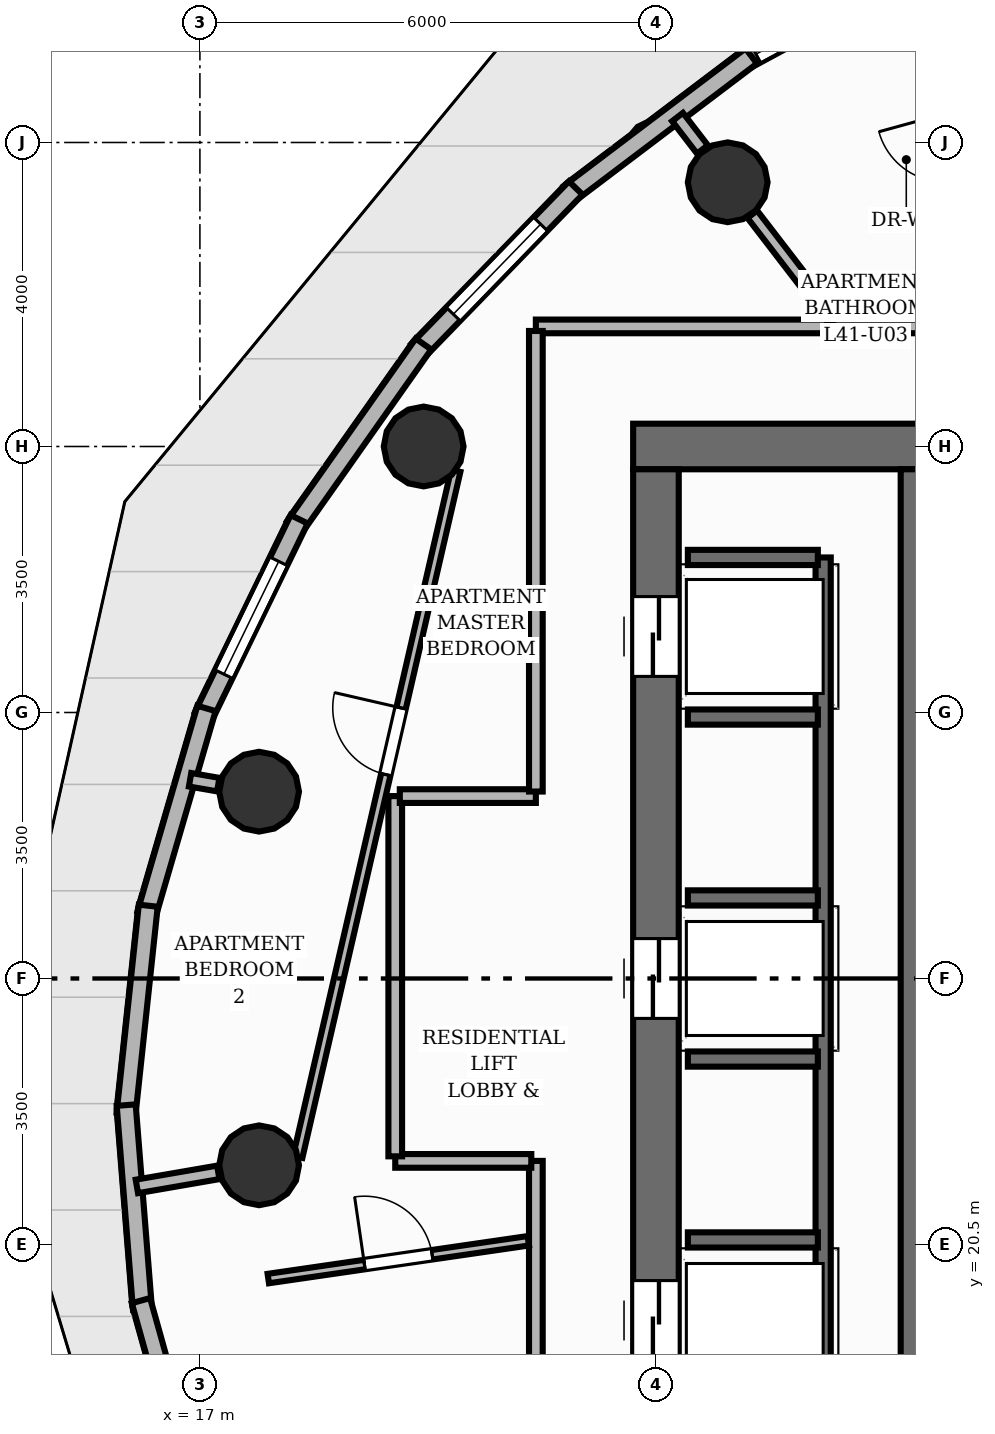
"""IFC4 building model, lengths in metres.
Left out: names, types, materials, properties, quantities, classifications, styles, units other than length and angle.
Written with IfcOpenShell. Run it as: python <this file> out.ifc"""

import sys

from ifc_helpers import new_model, si_unit, direction, frame, frame_2d, origin, origin_2d, place, context, subcontext, project, spatial, rectangle, circle, extrude, element, fill, save


model = new_model("IFC4")
c1 = context("Model", 3, precision=1e-05, world=origin(), true_north=direction((0.0, 1.0)))
c2 = subcontext(c1, "Body", "Model", "MODEL_VIEW")
j1 = project(units=[si_unit("LENGTHUNIT", "METRE"), si_unit("PLANEANGLEUNIT", "RADIAN")], contexts=[c1])
p1 = place(None, origin())
s1 = spatial("IfcSite", under=j1, at=p1, CompositionType="ELEMENT")
p2 = place(p1, origin())
s2 = spatial("IfcBuilding", under=s1, at=p2, CompositionType="ELEMENT")
p3 = place(p2, frame((0.0, 0.0, 139.36)))
s3 = spatial("IfcBuildingStorey", under=s2, at=p3, CompositionType="ELEMENT", Elevation=139.36)
p4 = place(p3, frame((22.7, 31.0, 0.0), z_axis=(0.0, 0.0, 1.0), x_axis=(1.0, 0.0, 0.0)))
e1 = element("IfcWall", 1, at=p4, inside=s3, PredefinedType="SHEAR", context=c2, shape_type="SweptSolid", body=[
    extrude(rectangle(XDim=15.1, YDim=0.6, at=frame_2d((7.55, 0.0))), origin(), (0.0, 0.0, 1.0), 3.2),
])
p5 = place(p4, frame((11.7, 0.0, 0.0)))
e2 = element("IfcOpeningElement", 2, at=p5, cuts=e1, PredefinedType="OPENING", context=c2, shape_type="SweptSolid", body=[
    extrude(rectangle(XDim=1.1, YDim=2.15, at=frame_2d((0.55, 1.075))), frame((0.0, 0.31, 0.0), z_axis=(0.0, -1.0, 0.0), x_axis=(1.0, 0.0, 0.0)), (0.0, 0.0, 1.0), 0.62),
])
p6 = place(p3, frame((23.0, 17.3, 0.0), z_axis=(0.0, 0.0, 1.0), x_axis=(0.0, 1.0, 0.0)))
e3 = element("IfcWall", 3, at=p6, inside=s3, PredefinedType="SHEAR", context=c2, shape_type="SweptSolid", body=[
    extrude(rectangle(XDim=13.4, YDim=0.6, at=frame_2d((6.7, 0.0))), origin(), (0.0, 0.0, 1.0), 3.2),
])
p7 = place(p6, frame((1.675, 0.0, 0.0)))
e4 = element("IfcOpeningElement", 4, at=p7, cuts=e3, PredefinedType="OPENING", context=c2, shape_type="SweptSolid", body=[
    extrude(rectangle(XDim=1.05, YDim=2.15, at=frame_2d((0.525, 1.075))), frame((0.0, 0.31, 0.0), z_axis=(0.0, -1.0, 0.0), x_axis=(1.0, 0.0, 0.0)), (0.0, 0.0, 1.0), 0.62),
])
p8 = place(p6, frame((6.175, 0.0, 0.0)))
e5 = element("IfcOpeningElement", 5, at=p8, cuts=e3, PredefinedType="OPENING", context=c2, shape_type="SweptSolid", body=[
    extrude(rectangle(XDim=1.05, YDim=2.15, at=frame_2d((0.525, 1.075))), frame((0.0, 0.31, 0.0), z_axis=(0.0, -1.0, 0.0), x_axis=(1.0, 0.0, 0.0)), (0.0, 0.0, 1.0), 0.62),
])
p9 = place(p6, frame((10.675, 0.0, 0.0)))
e6 = element("IfcOpeningElement", 6, at=p9, cuts=e3, PredefinedType="OPENING", context=c2, shape_type="SweptSolid", body=[
    extrude(rectangle(XDim=1.05, YDim=2.15, at=frame_2d((0.525, 1.075))), frame((0.0, 0.31, 0.0), z_axis=(0.0, -1.0, 0.0), x_axis=(1.0, 0.0, 0.0)), (0.0, 0.0, 1.0), 0.62),
])
p10 = place(p3, frame((26.5, 17.3, 0.0), z_axis=(0.0, 0.0, 1.0), x_axis=(0.0, 1.0, 0.0)))
e7 = element("IfcWall", 7, at=p10, inside=s3, PredefinedType="SHEAR", context=c2, shape_type="SweptSolid", body=[
    extrude(rectangle(XDim=13.4, YDim=0.56, at=frame_2d((6.7, 0.0))), origin(), (0.0, 0.0, 1.0), 3.2),
])
for number, where, z_axis, x_axis in (
    (8, (23.944, 34.477, 0.0), (0.0, 0.0, 1.0), (1.0, 0.0, 0.0)),
    (9, (19.944, 31.0, 0.0), (0.0, 0.0, 1.0), (1.0, 0.0, 0.0)),
    (10, (17.779, 26.458, 0.0), (0.0, 0.0, 1.0), (1.0, 0.0, 0.0)),
    (11, (17.779, 21.542, 0.0), (0.0, 0.0, 1.0), (1.0, 0.0, 0.0)),
):
    element("IfcColumn", number, at=place(p3, frame(where, z_axis=z_axis, x_axis=x_axis)), inside=s3, PredefinedType="COLUMN", context=c2, shape_type="SweptSolid", body=[
        extrude(circle(Radius=0.525, at=origin_2d()), origin(), (0.0, 0.0, 1.0), 3.2),
    ])
p11 = place(p3, frame((24.163, 36.079, 0.0), z_axis=(0.0, 0.0, 1.0), x_axis=(0.879567466611, 0.475774181393, 0.0)))
e12 = element("IfcWall", 12, at=p11, inside=s3, PredefinedType="SOLIDWALL", context=c2, shape_type="SweptSolid", body=[
    extrude(rectangle(XDim=2.998, YDim=0.25, at=frame_2d((1.499, 0.0))), origin(), (0.0, 0.0, 1.0), 2.96),
])
p12 = place(p11, frame((0.175, 0.0, 0.85)))
e13 = element("IfcOpeningElement", 13, at=p12, cuts=e12, PredefinedType="OPENING", context=c2, shape_type="SweptSolid", body=[
    extrude(rectangle(XDim=1.65, YDim=1.55, at=frame_2d((0.825, 0.775))), frame((0.0, 0.135, 0.0), z_axis=(0.0, -1.0, 0.0), x_axis=(1.0, 0.0, 0.0)), (0.0, 0.0, 1.0), 0.27),
])
p13 = place(p3, frame((21.863, 34.329, 0.0), z_axis=(0.0, 0.0, 1.0), x_axis=(0.797511213298, 0.603304122863, 0.0)))
e14 = element("IfcWall", 14, at=p13, inside=s3, PredefinedType="SOLIDWALL", context=c2, shape_type="SweptSolid", body=[
    extrude(rectangle(XDim=2.998, YDim=0.25, at=frame_2d((1.499, 0.0))), origin(), (0.0, 0.0, 1.0), 2.96),
])
p14 = place(p3, frame((19.872, 32.264, 0.0), z_axis=(0.0, 0.0, 1.0), x_axis=(0.696240605886, 0.717808483312, 0.0)))
e15 = element("IfcWall", 15, at=p14, inside=s3, PredefinedType="SOLIDWALL", context=c2, shape_type="SweptSolid", body=[
    extrude(rectangle(XDim=2.977, YDim=0.25, at=frame_2d((1.489, 0.0))), origin(), (0.0, 0.0, 1.0), 2.96),
])
p15 = place(p14, frame((0.664, 0.0, 0.85)))
e16 = element("IfcOpeningElement", 16, at=p15, cuts=e15, PredefinedType="OPENING", context=c2, shape_type="SweptSolid", body=[
    extrude(rectangle(XDim=1.65, YDim=1.55, at=frame_2d((0.825, 0.775))), frame((0.0, 0.135, 0.0), z_axis=(0.0, -1.0, 0.0), x_axis=(1.0, 0.0, 0.0)), (0.0, 0.0, 1.0), 0.27),
])
p16 = place(p3, frame((18.25, 29.948, 0.0), z_axis=(0.0, 0.0, 1.0), x_axis=(0.576020449187, 0.817435283137, 0.0)))
e17 = element("IfcWall", 17, at=p16, inside=s3, PredefinedType="SOLIDWALL", context=c2, shape_type="SweptSolid", body=[
    extrude(rectangle(XDim=2.937, YDim=0.25, at=frame_2d((1.468, 0.0))), origin(), (0.0, 0.0, 1.0), 2.96),
])
p17 = place(p3, frame((17.047, 27.45, 0.0), z_axis=(0.0, 0.0, 1.0), x_axis=(0.436882419805, 0.899518621967, 0.0)))
e18 = element("IfcWall", 18, at=p17, inside=s3, PredefinedType="SOLIDWALL", context=c2, shape_type="SweptSolid", body=[
    extrude(rectangle(XDim=2.882, YDim=0.25, at=frame_2d((1.441, 0.0))), origin(), (0.0, 0.0, 1.0), 2.96),
])
p18 = place(p17, frame((0.616, 0.0, 0.85)))
e19 = element("IfcOpeningElement", 19, at=p18, cuts=e18, PredefinedType="OPENING", context=c2, shape_type="SweptSolid", body=[
    extrude(rectangle(XDim=1.65, YDim=1.55, at=frame_2d((0.825, 0.775))), frame((0.0, 0.135, 0.0), z_axis=(0.0, -1.0, 0.0), x_axis=(1.0, 0.0, 0.0)), (0.0, 0.0, 1.0), 0.27),
])
p19 = place(p3, frame((16.299, 24.848, 0.0), z_axis=(0.0, 0.0, 1.0), x_axis=(0.27958078407, 0.960122172007, 0.0)))
e20 = element("IfcWall", 20, at=p19, inside=s3, PredefinedType="SOLIDWALL", context=c2, shape_type="SweptSolid", body=[
    extrude(rectangle(XDim=2.818, YDim=0.25, at=frame_2d((1.409, 0.0))), origin(), (0.0, 0.0, 1.0), 2.96),
])
p20 = place(p3, frame((16.029, 22.221, 0.0), z_axis=(0.0, 0.0, 1.0), x_axis=(0.106010014212, 0.994365062181, 0.0)))
e21 = element("IfcWall", 21, at=p20, inside=s3, PredefinedType="SOLIDWALL", context=c2, shape_type="SweptSolid", body=[
    extrude(rectangle(XDim=2.752, YDim=0.25, at=frame_2d((1.376, 0.0))), origin(), (0.0, 0.0, 1.0), 2.96),
])
p21 = place(p3, frame((16.244, 19.65, 0.0), z_axis=(0.0, 0.0, 1.0), x_axis=(-0.079420906371, 0.996841170714, 0.0)))
e22 = element("IfcWall", 22, at=p21, inside=s3, PredefinedType="SOLIDWALL", context=c2, shape_type="SweptSolid", body=[
    extrude(rectangle(XDim=2.693, YDim=0.25, at=frame_2d((1.346, 0.0))), origin(), (0.0, 0.0, 1.0), 2.96),
])
p22 = place(p3, frame((16.938, 17.211, 0.0), z_axis=(0.0, 0.0, 1.0), x_axis=(-0.269469206067, 0.963009006698, 0.0)))
e23 = element("IfcWall", 23, at=p22, inside=s3, PredefinedType="SOLIDWALL", context=c2, shape_type="SweptSolid", body=[
    extrude(rectangle(XDim=2.648, YDim=0.25, at=frame_2d((1.324, 0.0))), origin(), (0.0, 0.0, 1.0), 2.96),
])
p23 = place(p3, frame((25.2, 18.46, 0.0), z_axis=(0.0, 0.0, 1.0), x_axis=(0.0, 1.0, 0.0)))
e24 = element("IfcWall", 24, at=p23, inside=s3, PredefinedType="SHEAR", context=c2, shape_type="SweptSolid", body=[
    extrude(rectangle(XDim=11.08, YDim=0.2, at=frame_2d((5.54, 0.0))), origin(), (0.0, 0.0, 1.0), 3.2),
])
for number, where, z_axis, x_axis in (
    (25, (23.42, 29.54, 0.0), (0.0, 0.0, 1.0), (1.0, 0.0, 0.0)),
    (26, (23.42, 20.56, 0.0), (0.0, 0.0, 1.0), (1.0, 0.0, 0.0)),
    (27, (23.42, 22.94, 0.0), (0.0, 0.0, 1.0), (1.0, 0.0, 0.0)),
    (28, (23.42, 25.06, 0.0), (0.0, 0.0, 1.0), (1.0, 0.0, 0.0)),
    (29, (23.42, 27.44, 0.0), (0.0, 0.0, 1.0), (1.0, 0.0, 0.0)),
):
    element("IfcWall", number, at=place(p3, frame(where, z_axis=z_axis, x_axis=x_axis)), inside=s3, PredefinedType="SHEAR", context=c2, shape_type="SweptSolid", body=[
        extrude(rectangle(XDim=1.71, YDim=0.2, at=frame_2d((0.855, 0.0))), origin(), (0.0, 0.0, 1.0), 3.2),
    ])
p24 = place(p3, frame((23.612, 34.908, 0.0), z_axis=(0.0, 0.0, 1.0), x_axis=(-0.609469486836, 0.792809526063, 0.0)))
e30 = element("IfcWall", 30, at=p24, inside=s3, PredefinedType="PARTITIONING", context=c2, shape_type="SweptSolid", body=[
    extrude(rectangle(XDim=0.538, YDim=0.18, at=frame_2d((0.269, 0.0))), origin(), (0.0, 0.0, 1.0), 2.336),
])
p25 = place(p3, frame((17.242, 26.551, 0.0), z_axis=(0.0, 0.0, 1.0), x_axis=(-0.98535888436, 0.170493017491, 0.0)))
e31 = element("IfcWall", 31, at=p25, inside=s3, PredefinedType="PARTITIONING", context=c2, shape_type="SweptSolid", body=[
    extrude(rectangle(XDim=0.377, YDim=0.18, at=frame_2d((0.188, 0.0))), origin(), (0.0, 0.0, 1.0), 2.336),
])
p26 = place(p3, frame((17.242, 21.449, 0.0), z_axis=(0.0, 0.0, 1.0), x_axis=(-0.985361391556, -0.170478526599, 0.0)))
e32 = element("IfcWall", 32, at=p26, inside=s3, PredefinedType="PARTITIONING", context=c2, shape_type="SweptSolid", body=[
    extrude(rectangle(XDim=1.087, YDim=0.18, at=frame_2d((0.543, 0.0))), origin(), (0.0, 0.0, 1.0), 2.336),
])
p27 = place(p3, frame((21.42, 32.58, 0.0), z_axis=(0.0, 0.0, 1.0), x_axis=(1.0, 0.0, 0.0)))
e33 = element("IfcWall", 33, at=p27, inside=s3, PredefinedType="PARTITIONING", context=c2, shape_type="SweptSolid", body=[
    extrude(rectangle(XDim=11.105, YDim=0.18, at=frame_2d((5.552, 0.0))), origin(), (0.0, 0.0, 1.0), 2.955),
])
p28 = place(p27, frame((8.093, 0.0, 0.0)))
e34 = element("IfcOpeningElement", 34, at=p28, cuts=e33, PredefinedType="OPENING", context=c2, shape_type="SweptSolid", body=[
    extrude(rectangle(XDim=1.05, YDim=2.15, at=frame_2d((0.525, 1.075))), frame((0.0, 0.1, 0.0), z_axis=(0.0, -1.0, 0.0), x_axis=(1.0, 0.0, 0.0)), (0.0, 0.0, 1.0), 0.2),
])
p29 = place(p3, frame((21.42, 15.48, 0.0), z_axis=(0.0, 0.0, 1.0), x_axis=(0.0, 1.0, 0.0)))
e35 = element("IfcWall", 35, at=p29, inside=s3, PredefinedType="PARTITIONING", context=c2, shape_type="SweptSolid", body=[
    extrude(rectangle(XDim=6.12, YDim=0.18, at=frame_2d((3.06, 0.0))), origin(), (0.0, 0.0, 1.0), 2.955),
])
p30 = place(p29, frame((2.167, 0.0, 0.0)))
e36 = element("IfcOpeningElement", 36, at=p30, cuts=e35, PredefinedType="OPENING", context=c2, shape_type="SweptSolid", body=[
    extrude(rectangle(XDim=1.05, YDim=2.15, at=frame_2d((0.525, 1.075))), frame((0.0, 0.1, 0.0), z_axis=(0.0, -1.0, 0.0), x_axis=(1.0, 0.0, 0.0)), (0.0, 0.0, 1.0), 0.2),
])
p31 = place(p3, frame((21.36, 21.6, 0.0), z_axis=(0.0, 0.0, 1.0), x_axis=(-1.0, 0.0, 0.0)))
e37 = element("IfcWall", 37, at=p31, inside=s3, PredefinedType="PARTITIONING", context=c2, shape_type="SweptSolid", body=[
    extrude(rectangle(XDim=1.79, YDim=0.18, at=frame_2d((0.895, 0.0))), origin(), (0.0, 0.0, 1.0), 2.336),
])
p32 = place(p3, frame((19.57, 21.66, 0.0), z_axis=(0.0, 0.0, 1.0), x_axis=(0.0, 1.0, 0.0)))
e38 = element("IfcWall", 38, at=p32, inside=s3, PredefinedType="PARTITIONING", context=c2, shape_type="SweptSolid", body=[
    extrude(rectangle(XDim=4.74, YDim=0.18, at=frame_2d((2.37, 0.0))), origin(), (0.0, 0.0, 1.0), 2.955),
])
p33 = place(p3, frame((19.63, 26.4, 0.0), z_axis=(0.0, 0.0, 1.0), x_axis=(1.0, 0.0, 0.0)))
e39 = element("IfcWall", 39, at=p33, inside=s3, PredefinedType="PARTITIONING", context=c2, shape_type="SweptSolid", body=[
    extrude(rectangle(XDim=1.79, YDim=0.18, at=frame_2d((0.895, 0.0))), origin(), (0.0, 0.0, 1.0), 2.955),
])
p34 = place(p3, frame((21.42, 26.46, 0.0), z_axis=(0.0, 0.0, 1.0), x_axis=(0.0, 1.0, 0.0)))
e40 = element("IfcWall", 40, at=p34, inside=s3, PredefinedType="PARTITIONING", context=c2, shape_type="SweptSolid", body=[
    extrude(rectangle(XDim=6.06, YDim=0.18, at=frame_2d((3.03, 0.0))), origin(), (0.0, 0.0, 1.0), 2.955),
])
p35 = place(p3, frame((27.545, 32.677, 0.0), z_axis=(0.0, 0.0, 1.0), x_axis=(-0.265393905211, 0.964140070258, 0.0)))
e41 = element("IfcWall", 41, at=p35, inside=s3, PredefinedType="PLUMBINGWALL", context=c2, shape_type="SweptSolid", body=[
    extrude(rectangle(XDim=4.708, YDim=0.16, at=frame_2d((2.354, 0.0))), origin(), (0.0, 0.0, 1.0), 2.955),
])
p36 = place(p35, frame((1.904, 0.0, 0.0)))
e42 = element("IfcOpeningElement", 42, at=p36, cuts=e41, PredefinedType="OPENING", context=c2, shape_type="SweptSolid", body=[
    extrude(rectangle(XDim=0.9, YDim=2.1, at=frame_2d((0.45, 1.05))), frame((0.0, 0.09, 0.0), z_axis=(0.0, -1.0, 0.0), x_axis=(1.0, 0.0, 0.0)), (0.0, 0.0, 1.0), 0.18),
])
p37 = place(p3, frame((25.342, 32.659, 0.0), z_axis=(0.0, 0.0, 1.0), x_axis=(-0.609536601946, 0.792757927042, 0.0)))
e43 = element("IfcWall", 43, at=p37, inside=s3, PredefinedType="PLUMBINGWALL", context=c2, shape_type="SweptSolid", body=[
    extrude(rectangle(XDim=1.761, YDim=0.16, at=frame_2d((0.881, 0.0))), origin(), (0.0, 0.0, 1.0), 2.336),
])
p38 = place(p3, frame((17.899, 20.052, 0.0), z_axis=(0.0, 0.0, 1.0), x_axis=(0.989601977359, 0.143832980941, 0.0)))
e44 = element("IfcWall", 44, at=p38, inside=s3, PredefinedType="PARTITIONING", context=c2, shape_type="SweptSolid", body=[
    extrude(rectangle(XDim=3.458, YDim=0.125, at=frame_2d((1.729, 0.0))), origin(), (0.0, 0.0, 1.0), 2.692),
])
p39 = place(p38, frame((1.279, 0.0, 0.0)))
e45 = element("IfcOpeningElement", 45, at=p39, cuts=e44, PredefinedType="OPENING", context=c2, shape_type="SweptSolid", body=[
    extrude(rectangle(XDim=0.9, YDim=2.1, at=frame_2d((0.45, 1.05))), frame((0.0, 0.073, 0.0), z_axis=(0.0, -1.0, 0.0), x_axis=(1.0, 0.0, 0.0)), (0.0, 0.0, 1.0), 0.145),
])
p40 = place(p3, frame((18.287, 21.653, 0.0), z_axis=(0.0, 0.0, 1.0), x_axis=(0.2244032695, 0.974496368714, 0.0)))
e46 = element("IfcWall", 46, at=p40, inside=s3, PredefinedType="PARTITIONING", context=c2, shape_type="SweptSolid", body=[
    extrude(rectangle(XDim=9.263, YDim=0.125, at=frame_2d((4.631, 0.0))), origin(), (0.0, 0.0, 1.0), 2.955),
])
p41 = place(p40, frame((5.161, 0.0, 0.0)))
e47 = element("IfcOpeningElement", 47, at=p41, cuts=e46, PredefinedType="OPENING", context=c2, shape_type="SweptSolid", body=[
    extrude(rectangle(XDim=0.9, YDim=2.1, at=frame_2d((0.45, 1.05))), frame((0.0, 0.073, 0.0), z_axis=(0.0, -1.0, 0.0), x_axis=(1.0, 0.0, 0.0)), (0.0, 0.0, 1.0), 0.145),
])
p42 = place(p12, origin())
e48 = element("IfcWindow", 48, at=p42, inside=s3, PartitioningType="SINGLE_PANEL", PredefinedType="WINDOW", context=c2, shape_type="SweptSolid", body=[
    extrude(rectangle(XDim=1.65, YDim=1.55, at=frame_2d((0.825, 0.775))), frame((0.0, 0.03, 0.0), z_axis=(0.0, -1.0, 0.0), x_axis=(1.0, 0.0, 0.0)), (0.0, 0.0, 1.0), 0.06),
])
fill(e13, e48)
p43 = place(p15, origin())
e49 = element("IfcWindow", 49, at=p43, inside=s3, PartitioningType="SINGLE_PANEL", PredefinedType="WINDOW", context=c2, shape_type="SweptSolid", body=[
    extrude(rectangle(XDim=1.65, YDim=1.55, at=frame_2d((0.825, 0.775))), frame((0.0, 0.03, 0.0), z_axis=(0.0, -1.0, 0.0), x_axis=(1.0, 0.0, 0.0)), (0.0, 0.0, 1.0), 0.06),
])
fill(e16, e49)
p44 = place(p18, origin())
e50 = element("IfcWindow", 50, at=p44, inside=s3, PartitioningType="SINGLE_PANEL", PredefinedType="WINDOW", context=c2, shape_type="SweptSolid", body=[
    extrude(rectangle(XDim=1.65, YDim=1.55, at=frame_2d((0.825, 0.775))), frame((0.0, 0.03, 0.0), z_axis=(0.0, -1.0, 0.0), x_axis=(1.0, 0.0, 0.0)), (0.0, 0.0, 1.0), 0.06),
])
fill(e19, e50)
p45 = place(p7, origin())
e51 = element("IfcDoor", 51, at=p45, inside=s3, OperationType="DOUBLE_DOOR_SLIDING", PredefinedType="DOOR", context=c2, shape_type="SweptSolid", body=[
    extrude(rectangle(XDim=1.05, YDim=2.15, at=frame_2d((0.525, 1.075))), frame((0.0, 0.025, 0.0), z_axis=(0.0, -1.0, 0.0), x_axis=(1.0, 0.0, 0.0)), (0.0, 0.0, 1.0), 0.05),
])
fill(e4, e51)
p46 = place(p8, origin())
e52 = element("IfcDoor", 52, at=p46, inside=s3, OperationType="DOUBLE_DOOR_SLIDING", PredefinedType="DOOR", context=c2, shape_type="SweptSolid", body=[
    extrude(rectangle(XDim=1.05, YDim=2.15, at=frame_2d((0.525, 1.075))), frame((0.0, 0.025, 0.0), z_axis=(0.0, -1.0, 0.0), x_axis=(1.0, 0.0, 0.0)), (0.0, 0.0, 1.0), 0.05),
])
fill(e5, e52)
p47 = place(p9, origin())
e53 = element("IfcDoor", 53, at=p47, inside=s3, OperationType="DOUBLE_DOOR_SLIDING", PredefinedType="DOOR", context=c2, shape_type="SweptSolid", body=[
    extrude(rectangle(XDim=1.05, YDim=2.15, at=frame_2d((0.525, 1.075))), frame((0.0, 0.025, 0.0), z_axis=(0.0, -1.0, 0.0), x_axis=(1.0, 0.0, 0.0)), (0.0, 0.0, 1.0), 0.05),
])
fill(e6, e53)
p48 = place(p39, origin())
e54 = element("IfcDoor", 54, at=p48, inside=s3, OperationType="SINGLE_SWING_LEFT", PredefinedType="DOOR", context=c2, shape_type="SweptSolid", body=[
    extrude(rectangle(XDim=0.9, YDim=2.1, at=frame_2d((0.45, 1.05))), frame((0.0, 0.025, 0.0), z_axis=(0.0, -1.0, 0.0), x_axis=(1.0, 0.0, 0.0)), (0.0, 0.0, 1.0), 0.05),
])
fill(e45, e54)
p49 = place(p41, origin())
e55 = element("IfcDoor", 55, at=p49, inside=s3, OperationType="SINGLE_SWING_RIGHT", PredefinedType="DOOR", context=c2, shape_type="SweptSolid", body=[
    extrude(rectangle(XDim=0.9, YDim=2.1, at=frame_2d((0.45, 1.05))), frame((0.0, 0.025, 0.0), z_axis=(0.0, -1.0, 0.0), x_axis=(1.0, 0.0, 0.0)), (0.0, 0.0, 1.0), 0.05),
])
fill(e47, e55)
save(model, sys.argv[1])
